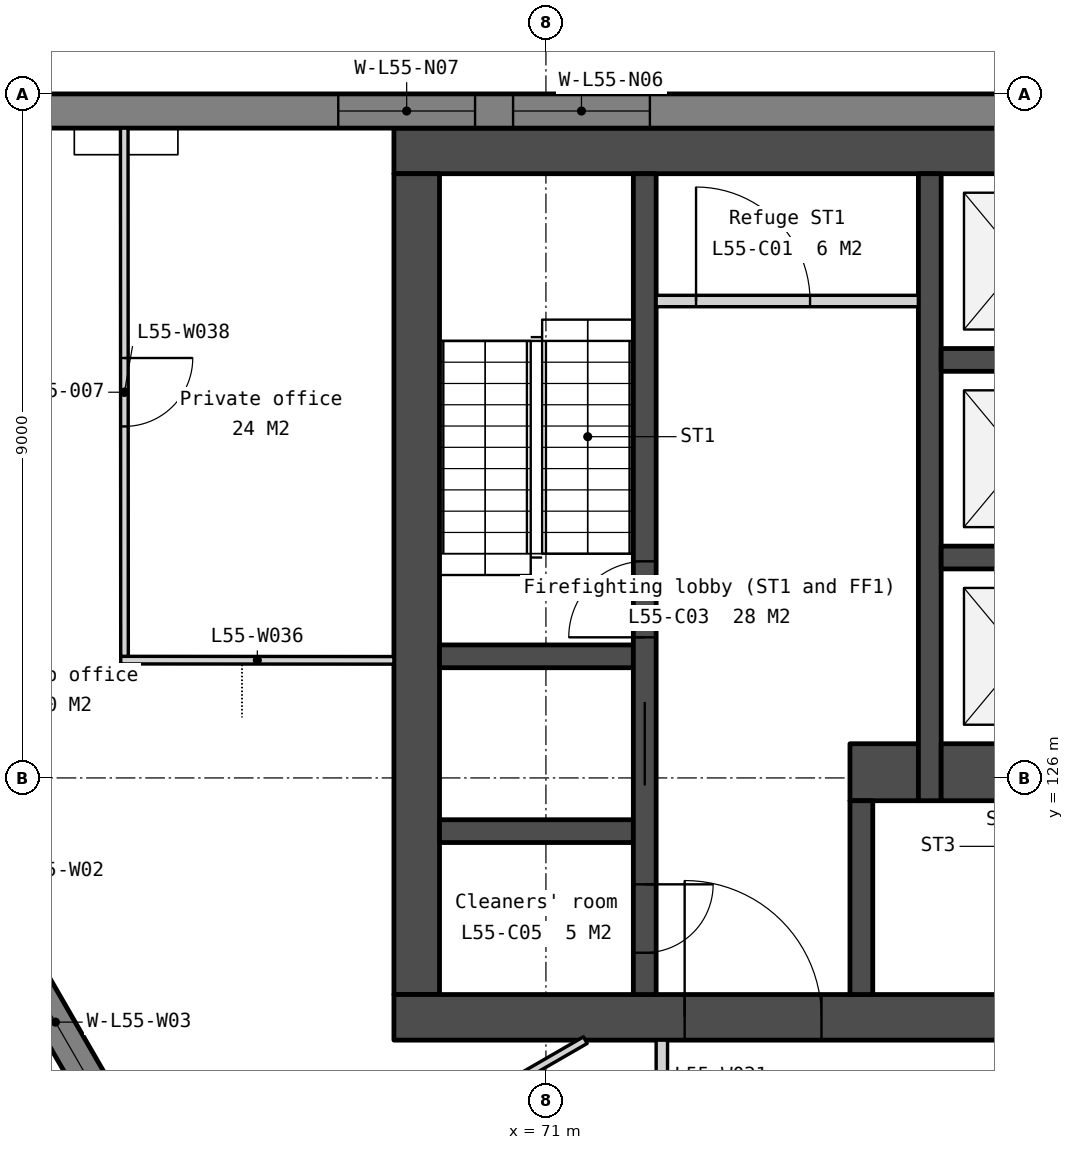
"""IFC4 building model, lengths in metres.
Left out: names, types, materials, properties, quantities, classifications, styles, units other than length and angle.
Written with IfcOpenShell. Run it as: python <this file> out.ifc"""

import sys

from ifc_helpers import new_model, si_unit, direction, frame, frame_2d, origin, place, context, subcontext, project, spatial, polyline, rectangle, outline, extrude, element, fill, save


model = new_model("IFC4")
c1 = context("Model", 3, precision=1e-05, world=origin(), true_north=direction((0.0, 1.0)))
c2 = subcontext(c1, "Body", "Model", "MODEL_VIEW")
j1 = project(units=[si_unit("LENGTHUNIT", "METRE"), si_unit("PLANEANGLEUNIT", "RADIAN")], contexts=[c1])
p1 = place(None, origin())
s1 = spatial("IfcSite", under=j1, at=p1, CompositionType="ELEMENT")
p2 = place(p1, origin())
s2 = spatial("IfcBuilding", under=s1, at=p2, CompositionType="ELEMENT")
p3 = place(p2, frame((0.0, 0.0, 219.2)))
s3 = spatial("IfcBuildingStorey", under=s2, at=p3, CompositionType="ELEMENT", Elevation=219.2)
p4 = place(p3, frame((69.0, 134.25, 0.0), z_axis=(0.0, 0.0, 1.0), x_axis=(1.0, 0.0, 0.0)))
e1 = element("IfcWall", 1, at=p4, inside=s3, PredefinedType="SOLIDWALL", context=c2, shape_type="SweptSolid", body=[
    extrude(rectangle(XDim=22.0, YDim=0.6, at=frame_2d((11.0, 0.0))), origin(), (0.0, 0.0, 1.0), 3.75),
])
p5 = place(p3, frame((69.3, 133.95, 0.0), z_axis=(0.0, 0.0, 1.0), x_axis=(0.0, -1.0, 0.0)))
e2 = element("IfcWall", 2, at=p5, inside=s3, PredefinedType="SOLIDWALL", context=c2, shape_type="SweptSolid", body=[
    extrude(rectangle(XDim=10.8, YDim=0.6, at=frame_2d((5.4, 0.0))), origin(), (0.0, 0.0, 1.0), 3.75),
])
p6 = place(p3, frame((69.0, 122.85, 0.0), z_axis=(0.0, 0.0, 1.0), x_axis=(1.0, 0.0, 0.0)))
e3 = element("IfcWall", 3, at=p6, inside=s3, PredefinedType="SOLIDWALL", context=c2, shape_type="SweptSolid", body=[
    extrude(rectangle(XDim=22.0, YDim=0.6, at=frame_2d((11.0, 0.0))), origin(), (0.0, 0.0, 1.0), 3.75),
])
p7 = place(p6, frame((16.375, 0.0, 0.0)))
e4 = element("IfcOpeningElement", 4, at=p7, cuts=e3, PredefinedType="OPENING", context=c2, shape_type="SweptSolid", body=[
    extrude(rectangle(XDim=1.8, YDim=2.1, at=frame_2d((0.9, 1.05))), frame((0.0, 0.31, 0.0), z_axis=(0.0, -1.0, 0.0), x_axis=(1.0, 0.0, 0.0)), (0.0, 0.0, 1.0), 0.62),
])
p8 = place(p6, frame((3.825, 0.0, 0.0)))
e5 = element("IfcOpeningElement", 5, at=p8, cuts=e3, PredefinedType="OPENING", context=c2, shape_type="SweptSolid", body=[
    extrude(rectangle(XDim=1.8, YDim=2.1, at=frame_2d((0.9, 1.05))), frame((0.0, 0.31, 0.0), z_axis=(0.0, -1.0, 0.0), x_axis=(1.0, 0.0, 0.0)), (0.0, 0.0, 1.0), 0.62),
])
p9 = place(p6, frame((12.85, 0.0, 0.0)))
e6 = element("IfcOpeningElement", 6, at=p9, cuts=e3, PredefinedType="OPENING", context=c2, shape_type="SweptSolid", body=[
    extrude(rectangle(XDim=1.5, YDim=2.1, at=frame_2d((0.75, 1.05))), frame((0.0, 0.31, 0.0), z_axis=(0.0, -1.0, 0.0), x_axis=(1.0, 0.0, 0.0)), (0.0, 0.0, 1.0), 0.62),
])
for number, where, z_axis, x_axis in (
    (7, (69.6, 127.6, 0.0), (0.0, 0.0, 1.0), (1.0, 0.0, 0.0)),
    (8, (69.6, 125.3, 0.0), (0.0, 0.0, 1.0), (1.0, 0.0, 0.0)),
):
    element("IfcWall", number, at=place(p3, frame(where, z_axis=z_axis, x_axis=x_axis)), inside=s3, PredefinedType="SOLIDWALL", context=c2, shape_type="SweptSolid", body=[
        extrude(rectangle(XDim=2.55, YDim=0.3, at=frame_2d((1.275, 0.0))), origin(), (0.0, 0.0, 1.0), 3.75),
    ])
p10 = place(p3, frame((72.3, 133.95, 0.0), z_axis=(0.0, 0.0, 1.0), x_axis=(0.0, -1.0, 0.0)))
e9 = element("IfcWall", 9, at=p10, inside=s3, PredefinedType="SOLIDWALL", context=c2, shape_type="SweptSolid", body=[
    extrude(rectangle(XDim=10.8, YDim=0.3, at=frame_2d((5.4, 0.0))), origin(), (0.0, 0.0, 1.0), 3.75),
])
p11 = place(p10, frame((6.95, 0.0, 0.0)))
e10 = element("IfcOpeningElement", 10, at=p11, cuts=e9, PredefinedType="OPENING", context=c2, shape_type="SweptSolid", body=[
    extrude(rectangle(XDim=1.1, YDim=2.1, at=frame_2d((0.55, 1.05))), frame((0.0, 0.16, 0.0), z_axis=(0.0, -1.0, 0.0), x_axis=(1.0, 0.0, 0.0)), (0.0, 0.0, 1.0), 0.32),
])
p12 = place(p10, frame((9.35, 0.0, 0.0)))
e11 = element("IfcOpeningElement", 11, at=p12, cuts=e9, PredefinedType="OPENING", context=c2, shape_type="SweptSolid", body=[
    extrude(rectangle(XDim=0.9, YDim=2.1, at=frame_2d((0.45, 1.05))), frame((0.0, 0.16, 0.0), z_axis=(0.0, -1.0, 0.0), x_axis=(1.0, 0.0, 0.0)), (0.0, 0.0, 1.0), 0.32),
])
p13 = place(p10, frame((5.1, 0.0, 0.0)))
e12 = element("IfcOpeningElement", 12, at=p13, cuts=e9, PredefinedType="OPENING", context=c2, shape_type="SweptSolid", body=[
    extrude(rectangle(XDim=1.0, YDim=2.1, at=frame_2d((0.5, 1.05))), frame((0.0, 0.16, 0.0), z_axis=(0.0, -1.0, 0.0), x_axis=(1.0, 0.0, 0.0)), (0.0, 0.0, 1.0), 0.32),
])
p14 = place(p3, frame((72.45, 132.275, 0.0), z_axis=(0.0, 0.0, 1.0), x_axis=(1.0, 0.0, 0.0)))
e13 = element("IfcWall", 13, at=p14, inside=s3, PredefinedType="PARTITIONING", context=c2, shape_type="SweptSolid", body=[
    extrude(rectangle(XDim=3.45, YDim=0.15, at=frame_2d((1.725, 0.0))), origin(), (0.0, 0.0, 1.0), 3.75),
])
p15 = place(p14, frame((0.525, 0.0, 0.0)))
e14 = element("IfcOpeningElement", 14, at=p15, cuts=e13, PredefinedType="OPENING", context=c2, shape_type="SweptSolid", body=[
    extrude(rectangle(XDim=1.5, YDim=2.1, at=frame_2d((0.75, 1.05))), frame((0.0, 0.085, 0.0), z_axis=(0.0, -1.0, 0.0), x_axis=(1.0, 0.0, 0.0)), (0.0, 0.0, 1.0), 0.17),
])
p16 = place(p3, frame((75.0, 126.075, 0.0), z_axis=(0.0, 0.0, 1.0), x_axis=(1.0, 0.0, 0.0)))
e15 = element("IfcWall", 15, at=p16, inside=s3, PredefinedType="SOLIDWALL", context=c2, shape_type="SweptSolid", body=[
    extrude(rectangle(XDim=0.9, YDim=0.75, at=frame_2d((0.45, 0.0))), origin(), (0.0, 0.0, 1.0), 3.75),
])
p17 = place(p3, frame((75.15, 125.7, 0.0), z_axis=(0.0, 0.0, 1.0), x_axis=(0.0, -1.0, 0.0)))
e16 = element("IfcWall", 16, at=p17, inside=s3, PredefinedType="SOLIDWALL", context=c2, shape_type="SweptSolid", body=[
    extrude(rectangle(XDim=2.55, YDim=0.3, at=frame_2d((1.275, 0.0))), origin(), (0.0, 0.0, 1.0), 3.75),
])
p18 = place(p3, frame((76.05, 133.95, 0.0), z_axis=(0.0, 0.0, 1.0), x_axis=(0.0, -1.0, 0.0)))
e17 = element("IfcWall", 17, at=p18, inside=s3, PredefinedType="SOLIDWALL", context=c2, shape_type="SweptSolid", body=[
    extrude(rectangle(XDim=8.25, YDim=0.3, at=frame_2d((4.125, 0.0))), origin(), (0.0, 0.0, 1.0), 3.75),
])
for number, where, z_axis, x_axis in (
    (18, (76.2, 131.5, 0.0), (0.0, 0.0, 1.0), (1.0, 0.0, 0.0)),
    (19, (76.2, 128.9, 0.0), (0.0, 0.0, 1.0), (1.0, 0.0, 0.0)),
):
    element("IfcWall", number, at=place(p3, frame(where, z_axis=z_axis, x_axis=x_axis)), inside=s3, PredefinedType="SOLIDWALL", context=c2, shape_type="SweptSolid", body=[
        extrude(rectangle(XDim=2.1, YDim=0.3, at=frame_2d((1.05, 0.0))), origin(), (0.0, 0.0, 1.0), 3.75),
    ])
p19 = place(p3, frame((76.2, 126.075, 0.0), z_axis=(0.0, 0.0, 1.0), x_axis=(1.0, 0.0, 0.0)))
e20 = element("IfcWall", 20, at=p19, inside=s3, PredefinedType="SOLIDWALL", context=c2, shape_type="SweptSolid", body=[
    extrude(rectangle(XDim=2.1, YDim=0.75, at=frame_2d((1.05, 0.0))), origin(), (0.0, 0.0, 1.0), 3.75),
])
p20 = place(p3, frame((99.365, 134.775, -0.15), z_axis=(0.0, 0.0, 1.0), x_axis=(-1.0, 0.0, 0.0)))
e21 = element("IfcWall", 21, at=p20, inside=s3, PredefinedType="SOLIDWALL", context=c2, shape_type="SweptSolid", body=[
    extrude(outline(polyline([(38.729, 0.0), (38.729, 3.9), (0.0, 3.9), (0.0, 0.0), (38.729, 0.0)])), frame((0.0, 0.225, 0.0), z_axis=(0.0, -1.0, 0.0), x_axis=(1.0, 0.0, 0.0)), (0.0, 0.0, 1.0), 0.45),
])
p21 = place(p20, frame((0.807, 0.0, 0.95)))
e22 = element("IfcOpeningElement", 22, at=p21, cuts=e21, PredefinedType="OPENING", context=c2, shape_type="SweptSolid", body=[
    extrude(rectangle(XDim=1.2, YDim=2.2, at=frame_2d((0.6, 1.1))), frame((0.0, 0.235, 0.0), z_axis=(0.0, -1.0, 0.0), x_axis=(1.0, 0.0, 0.0)), (0.0, 0.0, 1.0), 0.47),
])
p22 = place(p20, frame((7.632, 0.0, 0.95)))
e23 = element("IfcOpeningElement", 23, at=p22, cuts=e21, PredefinedType="OPENING", context=c2, shape_type="SweptSolid", body=[
    extrude(rectangle(XDim=1.8, YDim=2.2, at=frame_2d((0.9, 1.1))), frame((0.0, 0.235, 0.0), z_axis=(0.0, -1.0, 0.0), x_axis=(1.0, 0.0, 0.0)), (0.0, 0.0, 1.0), 0.47),
])
p23 = place(p20, frame((9.932, 0.0, 0.95)))
e24 = element("IfcOpeningElement", 24, at=p23, cuts=e21, PredefinedType="OPENING", context=c2, shape_type="SweptSolid", body=[
    extrude(rectangle(XDim=1.8, YDim=2.2, at=frame_2d((0.9, 1.1))), frame((0.0, 0.235, 0.0), z_axis=(0.0, -1.0, 0.0), x_axis=(1.0, 0.0, 0.0)), (0.0, 0.0, 1.0), 0.47),
])
p24 = place(p20, frame((17.315, 0.0, 0.95)))
e25 = element("IfcOpeningElement", 25, at=p24, cuts=e21, PredefinedType="OPENING", context=c2, shape_type="SweptSolid", body=[
    extrude(rectangle(XDim=1.8, YDim=2.2, at=frame_2d((0.9, 1.1))), frame((0.0, 0.235, 0.0), z_axis=(0.0, -1.0, 0.0), x_axis=(1.0, 0.0, 0.0)), (0.0, 0.0, 1.0), 0.47),
])
p25 = place(p20, frame((19.615, 0.0, 0.95)))
e26 = element("IfcOpeningElement", 26, at=p25, cuts=e21, PredefinedType="OPENING", context=c2, shape_type="SweptSolid", body=[
    extrude(rectangle(XDim=1.8, YDim=2.2, at=frame_2d((0.9, 1.1))), frame((0.0, 0.235, 0.0), z_axis=(0.0, -1.0, 0.0), x_axis=(1.0, 0.0, 0.0)), (0.0, 0.0, 1.0), 0.47),
])
p26 = place(p20, frame((26.997, 0.0, 0.95)))
e27 = element("IfcOpeningElement", 27, at=p26, cuts=e21, PredefinedType="OPENING", context=c2, shape_type="SweptSolid", body=[
    extrude(rectangle(XDim=1.8, YDim=2.2, at=frame_2d((0.9, 1.1))), frame((0.0, 0.235, 0.0), z_axis=(0.0, -1.0, 0.0), x_axis=(1.0, 0.0, 0.0)), (0.0, 0.0, 1.0), 0.47),
])
p27 = place(p20, frame((29.297, 0.0, 0.95)))
e28 = element("IfcOpeningElement", 28, at=p27, cuts=e21, PredefinedType="OPENING", context=c2, shape_type="SweptSolid", body=[
    extrude(rectangle(XDim=1.8, YDim=2.2, at=frame_2d((0.9, 1.1))), frame((0.0, 0.235, 0.0), z_axis=(0.0, -1.0, 0.0), x_axis=(1.0, 0.0, 0.0)), (0.0, 0.0, 1.0), 0.47),
])
p28 = place(p20, frame((36.722, 0.0, 0.95)))
e29 = element("IfcOpeningElement", 29, at=p28, cuts=e21, PredefinedType="OPENING", context=c2, shape_type="SweptSolid", body=[
    extrude(rectangle(XDim=1.2, YDim=2.2, at=frame_2d((0.6, 1.1))), frame((0.0, 0.235, 0.0), z_axis=(0.0, -1.0, 0.0), x_axis=(1.0, 0.0, 0.0)), (0.0, 0.0, 1.0), 0.47),
])
p29 = place(p3, frame((59.13, 132.168, -0.15), z_axis=(0.0, 0.0, 1.0), x_axis=(0.500002199942, -0.866024133644, 0.0)))
e30 = element("IfcWall", 30, at=p29, inside=s3, PredefinedType="SOLIDWALL", context=c2, shape_type="SweptSolid", body=[
    extrude(outline(polyline([(38.729, 0.0), (38.729, 3.9), (0.0, 3.9), (0.0, 0.0), (38.729, 0.0)])), frame((0.0, 0.225, 0.0), z_axis=(0.0, -1.0, 0.0), x_axis=(1.0, 0.0, 0.0)), (0.0, 0.0, 1.0), 0.45),
])
p30 = place(p29, frame((0.807, 0.0, 0.95)))
e31 = element("IfcOpeningElement", 31, at=p30, cuts=e30, PredefinedType="OPENING", context=c2, shape_type="SweptSolid", body=[
    extrude(rectangle(XDim=1.2, YDim=2.2, at=frame_2d((0.6, 1.1))), frame((0.0, 0.235, 0.0), z_axis=(0.0, -1.0, 0.0), x_axis=(1.0, 0.0, 0.0)), (0.0, 0.0, 1.0), 0.47),
])
p31 = place(p29, frame((7.632, 0.0, 0.95)))
e32 = element("IfcOpeningElement", 32, at=p31, cuts=e30, PredefinedType="OPENING", context=c2, shape_type="SweptSolid", body=[
    extrude(rectangle(XDim=1.8, YDim=2.2, at=frame_2d((0.9, 1.1))), frame((0.0, 0.235, 0.0), z_axis=(0.0, -1.0, 0.0), x_axis=(1.0, 0.0, 0.0)), (0.0, 0.0, 1.0), 0.47),
])
p32 = place(p29, frame((9.932, 0.0, 0.95)))
e33 = element("IfcOpeningElement", 33, at=p32, cuts=e30, PredefinedType="OPENING", context=c2, shape_type="SweptSolid", body=[
    extrude(rectangle(XDim=1.8, YDim=2.2, at=frame_2d((0.9, 1.1))), frame((0.0, 0.235, 0.0), z_axis=(0.0, -1.0, 0.0), x_axis=(1.0, 0.0, 0.0)), (0.0, 0.0, 1.0), 0.47),
])
p33 = place(p29, frame((17.315, 0.0, 0.95)))
e34 = element("IfcOpeningElement", 34, at=p33, cuts=e30, PredefinedType="OPENING", context=c2, shape_type="SweptSolid", body=[
    extrude(rectangle(XDim=1.8, YDim=2.2, at=frame_2d((0.9, 1.1))), frame((0.0, 0.235, 0.0), z_axis=(0.0, -1.0, 0.0), x_axis=(1.0, 0.0, 0.0)), (0.0, 0.0, 1.0), 0.47),
])
p34 = place(p29, frame((19.615, 0.0, 0.95)))
e35 = element("IfcOpeningElement", 35, at=p34, cuts=e30, PredefinedType="OPENING", context=c2, shape_type="SweptSolid", body=[
    extrude(rectangle(XDim=1.8, YDim=2.2, at=frame_2d((0.9, 1.1))), frame((0.0, 0.235, 0.0), z_axis=(0.0, -1.0, 0.0), x_axis=(1.0, 0.0, 0.0)), (0.0, 0.0, 1.0), 0.47),
])
p35 = place(p29, frame((26.997, 0.0, 0.95)))
e36 = element("IfcOpeningElement", 36, at=p35, cuts=e30, PredefinedType="OPENING", context=c2, shape_type="SweptSolid", body=[
    extrude(rectangle(XDim=1.8, YDim=2.2, at=frame_2d((0.9, 1.1))), frame((0.0, 0.235, 0.0), z_axis=(0.0, -1.0, 0.0), x_axis=(1.0, 0.0, 0.0)), (0.0, 0.0, 1.0), 0.47),
])
p36 = place(p29, frame((29.297, 0.0, 0.95)))
e37 = element("IfcOpeningElement", 37, at=p36, cuts=e30, PredefinedType="OPENING", context=c2, shape_type="SweptSolid", body=[
    extrude(rectangle(XDim=1.8, YDim=2.2, at=frame_2d((0.9, 1.1))), frame((0.0, 0.235, 0.0), z_axis=(0.0, -1.0, 0.0), x_axis=(1.0, 0.0, 0.0)), (0.0, 0.0, 1.0), 0.47),
])
p37 = place(p29, frame((36.722, 0.0, 0.95)))
e38 = element("IfcOpeningElement", 38, at=p37, cuts=e30, PredefinedType="OPENING", context=c2, shape_type="SweptSolid", body=[
    extrude(rectangle(XDim=1.2, YDim=2.2, at=frame_2d((0.6, 1.1))), frame((0.0, 0.235, 0.0), z_axis=(0.0, -1.0, 0.0), x_axis=(1.0, 0.0, 0.0)), (0.0, 0.0, 1.0), 0.47),
])
p38 = place(p3, frame((66.587, 119.703, 0.0), z_axis=(0.0, 0.0, 1.0), x_axis=(0.866023511746, 0.500003277092, 0.0)))
e39 = element("IfcWall", 39, at=p38, inside=s3, PredefinedType="PARTITIONING", context=c2, shape_type="SweptSolid", body=[
    extrude(rectangle(XDim=5.694, YDim=0.1, at=frame_2d((2.847, 0.0))), origin(), (0.0, 0.0, 1.0), 3.75),
])
p39 = place(p38, frame((2.397, 0.0, 0.0)))
e40 = element("IfcOpeningElement", 40, at=p39, cuts=e39, PredefinedType="OPENING", context=c2, shape_type="SweptSolid", body=[
    extrude(rectangle(XDim=0.9, YDim=2.1, at=frame_2d((0.45, 1.05))), frame((0.0, 0.06, 0.0), z_axis=(0.0, -1.0, 0.0), x_axis=(1.0, 0.0, 0.0)), (0.0, 0.0, 1.0), 0.12),
])
p40 = place(p3, frame((72.525, 120.05, 0.0), z_axis=(0.0, 0.0, 1.0), x_axis=(0.0, 1.0, 0.0)))
e41 = element("IfcWall", 41, at=p40, inside=s3, PredefinedType="PARTITIONING", context=c2, shape_type="SweptSolid", body=[
    extrude(rectangle(XDim=2.5, YDim=0.15, at=frame_2d((1.25, 0.0))), origin(), (0.0, 0.0, 1.0), 3.75),
])
p41 = place(p40, frame((0.75, 0.0, 0.0)))
e42 = element("IfcOpeningElement", 42, at=p41, cuts=e41, PredefinedType="OPENING", context=c2, shape_type="SweptSolid", body=[
    extrude(rectangle(XDim=1.0, YDim=2.1, at=frame_2d((0.5, 1.05))), frame((0.0, 0.085, 0.0), z_axis=(0.0, -1.0, 0.0), x_axis=(1.0, 0.0, 0.0)), (0.0, 0.0, 1.0), 0.17),
])
p42 = place(p3, frame((65.406, 127.55, 0.0), z_axis=(0.0, 0.0, 1.0), x_axis=(0.999999667846, -0.00081505101, 0.0)))
e43 = element("IfcWall", 43, at=p42, inside=s3, PredefinedType="PARTITIONING", context=c2, shape_type="SweptSolid", body=[
    extrude(rectangle(XDim=3.594, YDim=0.1, at=frame_2d((1.797, 0.0))), origin(), (0.0, 0.0, 1.0), 3.75),
])
p43 = place(p3, frame((65.452, 134.55, 0.0), z_axis=(0.0, 0.0, 1.0), x_axis=(0.000491814737, -0.999999879059, 0.0)))
e44 = element("IfcWall", 44, at=p43, inside=s3, PredefinedType="PARTITIONING", context=c2, shape_type="SweptSolid", body=[
    extrude(rectangle(XDim=6.95, YDim=0.1, at=frame_2d((3.475, 0.0))), origin(), (0.0, 0.0, 1.0), 3.75),
])
p44 = place(p43, frame((3.025, 0.0, 0.0)))
e45 = element("IfcOpeningElement", 45, at=p44, cuts=e44, PredefinedType="OPENING", context=c2, shape_type="SweptSolid", body=[
    extrude(rectangle(XDim=0.9, YDim=2.1, at=frame_2d((0.45, 1.05))), frame((0.0, 0.06, 0.0), z_axis=(0.0, -1.0, 0.0), x_axis=(1.0, 0.0, 0.0)), (0.0, 0.0, 1.0), 0.12),
])
p45 = place(p11, origin())
e46 = element("IfcDoor", 46, at=p45, inside=s3, OperationType="SLIDING_TO_LEFT", PredefinedType="DOOR", context=c2, shape_type="SweptSolid", body=[
    extrude(rectangle(XDim=1.1, YDim=2.1, at=frame_2d((0.55, 1.05))), frame((0.0, 0.025, 0.0), z_axis=(0.0, -1.0, 0.0), x_axis=(1.0, 0.0, 0.0)), (0.0, 0.0, 1.0), 0.05),
])
fill(e10, e46)
p46 = place(p8, origin())
e47 = element("IfcDoor", 47, at=p46, inside=s3, OperationType="DOUBLE_DOOR_DOUBLE_SWING", PredefinedType="DOOR", context=c2, shape_type="SweptSolid", body=[
    extrude(rectangle(XDim=1.8, YDim=2.1, at=frame_2d((0.9, 1.05))), frame((0.0, 0.025, 0.0), z_axis=(0.0, -1.0, 0.0), x_axis=(1.0, 0.0, 0.0)), (0.0, 0.0, 1.0), 0.05),
])
fill(e5, e47)
p47 = place(p15, origin())
e48 = element("IfcDoor", 48, at=p47, inside=s3, OperationType="DOUBLE_DOOR_DOUBLE_SWING", PredefinedType="DOOR", context=c2, shape_type="SweptSolid", body=[
    extrude(rectangle(XDim=1.5, YDim=2.1, at=frame_2d((0.75, 1.05))), frame((0.0, 0.025, 0.0), z_axis=(0.0, -1.0, 0.0), x_axis=(1.0, 0.0, 0.0)), (0.0, 0.0, 1.0), 0.05),
])
fill(e14, e48)
p48 = place(p12, origin())
e49 = element("IfcDoor", 49, at=p48, inside=s3, OperationType="SINGLE_SWING_LEFT", PredefinedType="DOOR", context=c2, shape_type="SweptSolid", body=[
    extrude(rectangle(XDim=0.9, YDim=2.1, at=frame_2d((0.45, 1.05))), frame((0.0, 0.025, 0.0), z_axis=(0.0, -1.0, 0.0), x_axis=(1.0, 0.0, 0.0)), (0.0, 0.0, 1.0), 0.05),
])
fill(e11, e49)
p49 = place(p13, origin())
e50 = element("IfcDoor", 50, at=p49, inside=s3, OperationType="SINGLE_SWING_RIGHT", PredefinedType="DOOR", context=c2, shape_type="SweptSolid", body=[
    extrude(rectangle(XDim=1.0, YDim=2.1, at=frame_2d((0.5, 1.05))), frame((0.0, 0.025, 0.0), z_axis=(0.0, -1.0, 0.0), x_axis=(1.0, 0.0, 0.0)), (0.0, 0.0, 1.0), 0.05),
])
fill(e12, e50)
p50 = place(p26, origin())
e51 = element("IfcWindow", 51, at=p50, inside=s3, PartitioningType="SINGLE_PANEL", PredefinedType="WINDOW", context=c2, shape_type="SweptSolid", body=[
    extrude(rectangle(XDim=1.8, YDim=2.2, at=frame_2d((0.9, 1.1))), frame((0.0, 0.03, 0.0), z_axis=(0.0, -1.0, 0.0), x_axis=(1.0, 0.0, 0.0)), (0.0, 0.0, 1.0), 0.06),
])
fill(e27, e51)
p51 = place(p27, origin())
e52 = element("IfcWindow", 52, at=p51, inside=s3, PartitioningType="SINGLE_PANEL", PredefinedType="WINDOW", context=c2, shape_type="SweptSolid", body=[
    extrude(rectangle(XDim=1.8, YDim=2.2, at=frame_2d((0.9, 1.1))), frame((0.0, 0.03, 0.0), z_axis=(0.0, -1.0, 0.0), x_axis=(1.0, 0.0, 0.0)), (0.0, 0.0, 1.0), 0.06),
])
fill(e28, e52)
p52 = place(p32, origin())
e53 = element("IfcWindow", 53, at=p52, inside=s3, PartitioningType="SINGLE_PANEL", PredefinedType="WINDOW", context=c2, shape_type="SweptSolid", body=[
    extrude(rectangle(XDim=1.8, YDim=2.2, at=frame_2d((0.9, 1.1))), frame((0.0, 0.03, 0.0), z_axis=(0.0, -1.0, 0.0), x_axis=(1.0, 0.0, 0.0)), (0.0, 0.0, 1.0), 0.06),
])
fill(e33, e53)
p53 = place(p44, origin())
e54 = element("IfcDoor", 54, at=p53, inside=s3, OperationType="SINGLE_SWING_LEFT", PredefinedType="DOOR", context=c2, shape_type="SweptSolid", body=[
    extrude(rectangle(XDim=0.9, YDim=2.1, at=frame_2d((0.45, 1.05))), frame((0.0, 0.025, 0.0), z_axis=(0.0, -1.0, 0.0), x_axis=(1.0, 0.0, 0.0)), (0.0, 0.0, 1.0), 0.05),
])
fill(e45, e54)
save(model, sys.argv[1])
